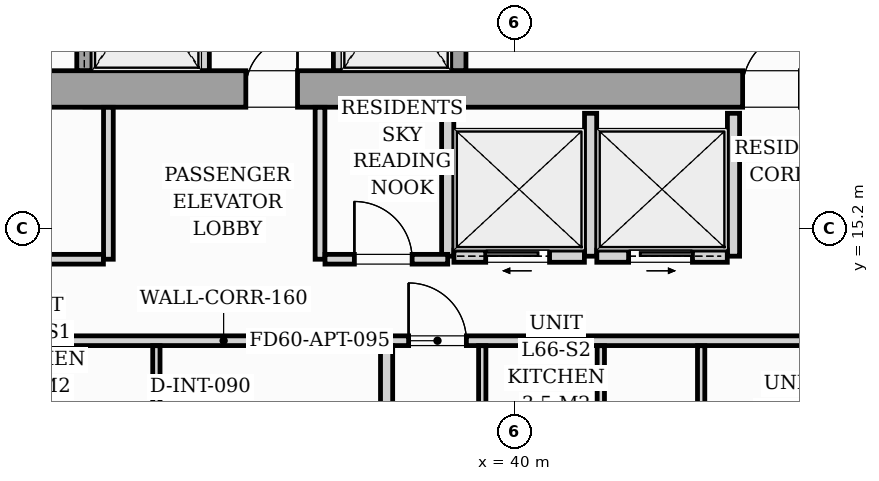
"""IFC4 building model, lengths in metres.
Left out: names, types, materials, properties, quantities, classifications, styles, units other than length and angle.
Written with IfcOpenShell. Run it as: python <this file> out.ifc"""

import sys

from ifc_helpers import new_model, si_unit, direction, frame, frame_2d, origin, origin_2d, place, context, subcontext, project, spatial, rectangle, i_section, extrude, source, transform, mapped, element, fill, save


model = new_model("IFC4")
c1 = context("Model", 3, precision=1e-05, world=origin(), true_north=direction((0.0, 1.0)))
c2 = subcontext(c1, "Body", "Model", "MODEL_VIEW")
j1 = project(units=[si_unit("LENGTHUNIT", "METRE"), si_unit("PLANEANGLEUNIT", "RADIAN")], contexts=[c1])
p1 = place(None, origin())
s1 = spatial("IfcSite", under=j1, at=p1, CompositionType="ELEMENT")
p2 = place(p1, origin())
s2 = spatial("IfcBuilding", under=s1, at=p2, CompositionType="ELEMENT")
p3 = place(p2, frame((0.0, 0.0, 229.8)))
s3 = spatial("IfcBuildingStorey", under=s2, at=p3, CompositionType="ELEMENT", Elevation=229.8)
m1 = source(origin(), c2, "Body", "SweptSolid", [
    extrude(i_section(OverallWidth=0.409, OverallDepth=0.425, WebThickness=0.033, FlangeThickness=0.052, FilletRadius=0.018, at=origin_2d()), origin(), (0.0, 0.0, 1.0), 3.296),
])
for number, where, z_axis, x_axis in (
    (1, (33.12, 17.4, 0.002), (0.0, 0.0, 1.0), (1.0, 0.0, 0.0)),
    (2, (38.88, 17.4, 0.002), (0.0, 0.0, 1.0), (1.0, 0.0, 0.0)),
):
    element("IfcColumn", number, at=place(p3, frame(where, z_axis=z_axis, x_axis=x_axis)), inside=s3, PredefinedType="PILASTER", context=c2, shape_type="MappedRepresentation", body=[
        mapped(m1, transform((0.0, 0.0, 0.0), scale=1.0)),
    ])
p4 = place(p3, frame((26.2, 17.5, 0.0), z_axis=(0.0, 0.0, 1.0), x_axis=(1.0, 0.0, 0.0)))
e3 = element("IfcWall", 3, at=p4, inside=s3, PredefinedType="SHEAR", context=c2, shape_type="SweptSolid", body=[
    extrude(rectangle(XDim=19.6, YDim=0.6, at=frame_2d((9.8, 0.0))), origin(), (0.0, 0.0, 1.0), 3.3),
])
p5 = place(p4, frame((0.95, 0.0, 0.0)))
e4 = element("IfcOpeningElement", 4, at=p5, cuts=e3, PredefinedType="OPENING", context=c2, shape_type="SweptSolid", body=[
    extrude(rectangle(XDim=0.95, YDim=2.06, at=frame_2d((0.475, 1.03))), frame((0.0, 0.31, 0.0), z_axis=(0.0, -1.0, 0.0), x_axis=(1.0, 0.0, 0.0)), (0.0, 0.0, 1.0), 0.62),
])
p6 = place(p4, frame((9.38, 0.0, 0.0)))
e5 = element("IfcOpeningElement", 5, at=p6, cuts=e3, PredefinedType="OPENING", context=c2, shape_type="SweptSolid", body=[
    extrude(rectangle(XDim=0.85, YDim=2.0, at=frame_2d((0.425, 1.0))), frame((0.0, 0.31, 0.0), z_axis=(0.0, -1.0, 0.0), x_axis=(1.0, 0.0, 0.0)), (0.0, 0.0, 1.0), 0.62),
])
p7 = place(p4, frame((17.55, 0.0, 0.0)))
e6 = element("IfcOpeningElement", 6, at=p7, cuts=e3, PredefinedType="OPENING", context=c2, shape_type="SweptSolid", body=[
    extrude(rectangle(XDim=0.95, YDim=2.06, at=frame_2d((0.475, 1.03))), frame((0.0, 0.31, 0.0), z_axis=(0.0, -1.0, 0.0), x_axis=(1.0, 0.0, 0.0)), (0.0, 0.0, 1.0), 0.62),
])
p8 = place(p3, frame((32.925, 17.802, 0.0), z_axis=(0.0, 0.0, 1.0), x_axis=(0.0, 1.0, 0.0)))
e7 = element("IfcWall", 7, at=p8, inside=s3, PredefinedType="SOLIDWALL", context=c2, shape_type="SweptSolid", body=[
    extrude(rectangle(XDim=2.646, YDim=0.25, at=frame_2d((1.323, 0.0))), origin(), (0.0, 0.0, 1.0), 3.3),
])
p9 = place(p8, frame((0.548, 0.0, 0.0)))
e8 = element("IfcOpeningElement", 8, at=p9, cuts=e7, PredefinedType="OPENING", context=c2, shape_type="SweptSolid", body=[
    extrude(rectangle(XDim=1.1, YDim=2.08, at=frame_2d((0.55, 1.04))), frame((0.0, 0.135, 0.0), z_axis=(0.0, -1.0, 0.0), x_axis=(1.0, 0.0, 0.0)), (0.0, 0.0, 1.0), 0.27),
])
for number, where, z_axis, x_axis in (
    (9, (34.9, 17.802, 0.0), (0.0, 0.0, 1.0), (0.0, 1.0, 0.0)),
    (10, (37.1, 17.802, 0.0), (0.0, 0.0, 1.0), (0.0, 1.0, 0.0)),
):
    element("IfcWall", number, at=place(p3, frame(where, z_axis=z_axis, x_axis=x_axis)), inside=s3, PredefinedType="PARTITIONING", context=c2, shape_type="SweptSolid", body=[
        extrude(rectangle(XDim=2.646, YDim=0.16, at=frame_2d((1.323, 0.0))), origin(), (0.0, 0.0, 1.0), 3.04),
    ])
p10 = place(p3, frame((39.075, 17.802, 0.0), z_axis=(0.0, 0.0, 1.0), x_axis=(0.0, 1.0, 0.0)))
e11 = element("IfcWall", 11, at=p10, inside=s3, PredefinedType="SOLIDWALL", context=c2, shape_type="SweptSolid", body=[
    extrude(rectangle(XDim=2.646, YDim=0.25, at=frame_2d((1.323, 0.0))), origin(), (0.0, 0.0, 1.0), 3.3),
])
p11 = place(p10, frame((0.548, 0.0, 0.0)))
e12 = element("IfcOpeningElement", 12, at=p11, cuts=e11, PredefinedType="OPENING", context=c2, shape_type="SweptSolid", body=[
    extrude(rectangle(XDim=1.1, YDim=2.08, at=frame_2d((0.55, 1.04))), frame((0.0, 0.135, 0.0), z_axis=(0.0, -1.0, 0.0), x_axis=(1.0, 0.0, 0.0)), (0.0, 0.0, 1.0), 0.27),
])
for number, where, z_axis, x_axis in (
    (13, (38.9, 14.75, 0.0), (0.0, 0.0, 1.0), (0.0, 1.0, 0.0)),
    (14, (41.25, 14.75, 0.0), (0.0, 0.0, 1.0), (0.0, 1.0, 0.0)),
    (15, (43.6, 14.75, 0.0), (0.0, 0.0, 1.0), (0.0, 1.0, 0.0)),
):
    element("IfcWall", number, at=place(p3, frame(where, z_axis=z_axis, x_axis=x_axis)), inside=s3, PredefinedType="PARTITIONING", context=c2, shape_type="SweptSolid", body=[
        extrude(rectangle(XDim=2.35, YDim=0.2, at=frame_2d((1.175, 0.0))), origin(), (0.0, 0.0, 1.0), 3.04),
    ])
p12 = place(p3, frame((39.002, 14.75, 0.0), z_axis=(0.0, 0.0, 1.0), x_axis=(1.0, 0.0, 0.0)))
e16 = element("IfcWall", 16, at=p12, inside=s3, PredefinedType="PARTITIONING", context=c2, shape_type="SweptSolid", body=[
    extrude(rectangle(XDim=2.146, YDim=0.2, at=frame_2d((1.073, 0.0))), origin(), (0.0, 0.0, 1.0), 3.04),
])
p13 = place(p12, frame((0.523, 0.0, 0.0)))
e17 = element("IfcOpeningElement", 17, at=p13, cuts=e16, PredefinedType="OPENING", context=c2, shape_type="SweptSolid", body=[
    extrude(rectangle(XDim=1.05, YDim=2.08, at=frame_2d((0.525, 1.04))), frame((0.0, 0.11, 0.0), z_axis=(0.0, -1.0, 0.0), x_axis=(1.0, 0.0, 0.0)), (0.0, 0.0, 1.0), 0.22),
])
p14 = place(p3, frame((41.352, 14.75, 0.0), z_axis=(0.0, 0.0, 1.0), x_axis=(1.0, 0.0, 0.0)))
e18 = element("IfcWall", 18, at=p14, inside=s3, PredefinedType="PARTITIONING", context=c2, shape_type="SweptSolid", body=[
    extrude(rectangle(XDim=2.146, YDim=0.2, at=frame_2d((1.073, 0.0))), origin(), (0.0, 0.0, 1.0), 3.04),
])
p15 = place(p14, frame((0.523, 0.0, 0.0)))
e19 = element("IfcOpeningElement", 19, at=p15, cuts=e18, PredefinedType="OPENING", context=c2, shape_type="SweptSolid", body=[
    extrude(rectangle(XDim=1.05, YDim=2.08, at=frame_2d((0.525, 1.04))), frame((0.0, 0.11, 0.0), z_axis=(0.0, -1.0, 0.0), x_axis=(1.0, 0.0, 0.0)), (0.0, 0.0, 1.0), 0.22),
])
p16 = place(p3, frame((24.55, 13.36, 0.0), z_axis=(0.0, 0.0, 1.0), x_axis=(1.0, 0.0, 0.0)))
e20 = element("IfcWall", 20, at=p16, inside=s3, PredefinedType="PARTITIONING", context=c2, shape_type="SweptSolid", body=[
    extrude(rectangle(XDim=21.33, YDim=0.16, at=frame_2d((10.665, 0.0))), origin(), (0.0, 0.0, 1.0), 2.55),
])
p17 = place(p16, frame((2.37, 0.0, 0.0)))
e21 = element("IfcOpeningElement", 21, at=p17, cuts=e20, PredefinedType="OPENING", context=c2, shape_type="SweptSolid", body=[
    extrude(rectangle(XDim=0.95, YDim=2.06, at=frame_2d((0.475, 1.03))), frame((0.0, 0.09, 0.0), z_axis=(0.0, -1.0, 0.0), x_axis=(1.0, 0.0, 0.0)), (0.0, 0.0, 1.0), 0.18),
])
p18 = place(p16, frame((13.707, 0.0, 0.0)))
e22 = element("IfcOpeningElement", 22, at=p18, cuts=e20, PredefinedType="OPENING", context=c2, shape_type="SweptSolid", body=[
    extrude(rectangle(XDim=0.95, YDim=2.06, at=frame_2d((0.475, 1.03))), frame((0.0, 0.09, 0.0), z_axis=(0.0, -1.0, 0.0), x_axis=(1.0, 0.0, 0.0)), (0.0, 0.0, 1.0), 0.18),
])
p19 = place(p3, frame((34.109, 9.024, 0.0), z_axis=(0.0, 0.0, 1.0), x_axis=(0.0, 1.0, 0.0)))
e23 = element("IfcWall", 23, at=p19, inside=s3, PredefinedType="PARTITIONING", context=c2, shape_type="SweptSolid", body=[
    extrude(rectangle(XDim=4.254, YDim=0.12, at=frame_2d((2.127, 0.0))), origin(), (0.0, 0.0, 1.0), 3.04),
])
p20 = place(p19, frame((2.395, 0.0, 0.0)))
e24 = element("IfcOpeningElement", 24, at=p20, cuts=e23, PredefinedType="OPENING", context=c2, shape_type="SweptSolid", body=[
    extrude(rectangle(XDim=0.9, YDim=2.05, at=frame_2d((0.45, 1.025))), frame((0.0, 0.07, 0.0), z_axis=(0.0, -1.0, 0.0), x_axis=(1.0, 0.0, 0.0)), (0.0, 0.0, 1.0), 0.14),
])
p21 = place(p3, frame((37.895, 8.68, 0.0), z_axis=(0.0, 0.0, 1.0), x_axis=(0.0, 1.0, 0.0)))
e25 = element("IfcWall", 25, at=p21, inside=s3, PredefinedType="PARTITIONING", context=c2, shape_type="SweptSolid", body=[
    extrude(rectangle(XDim=4.598, YDim=0.2, at=frame_2d((2.299, 0.0))), origin(), (0.0, 0.0, 1.0), 3.04),
])
p22 = place(p3, frame((43.068, 8.392, 0.0), z_axis=(0.0, 0.0, 1.0), x_axis=(0.0, 1.0, 0.0)))
e26 = element("IfcWall", 26, at=p22, inside=s3, PredefinedType="PARTITIONING", context=c2, shape_type="SweptSolid", body=[
    extrude(rectangle(XDim=4.886, YDim=0.12, at=frame_2d((2.443, 0.0))), origin(), (0.0, 0.0, 1.0), 3.04),
])
p23 = place(p22, frame((1.94, 0.0, 0.0)))
e27 = element("IfcOpeningElement", 27, at=p23, cuts=e26, PredefinedType="OPENING", context=c2, shape_type="SweptSolid", body=[
    extrude(rectangle(XDim=0.85, YDim=2.05, at=frame_2d((0.425, 1.025))), frame((0.0, 0.07, 0.0), z_axis=(0.0, -1.0, 0.0), x_axis=(1.0, 0.0, 0.0)), (0.0, 0.0, 1.0), 0.14),
])
for number, where, z_axis, x_axis in (
    (28, (39.468, 11.372, 0.0), (0.0, 0.0, 1.0), (0.0, 1.0, 0.0)),
    (29, (41.418, 11.372, 0.0), (0.0, 0.0, 1.0), (0.0, 1.0, 0.0)),
):
    element("IfcWall", number, at=place(p3, frame(where, z_axis=z_axis, x_axis=x_axis)), inside=s3, PredefinedType="PARTITIONING", context=c2, shape_type="SweptSolid", body=[
        extrude(rectangle(XDim=1.906, YDim=0.12, at=frame_2d((0.953, 0.0))), origin(), (0.0, 0.0, 1.0), 3.04),
    ])
p24 = place(p3, frame((33.32, 14.7, 0.0), z_axis=(0.0, 0.0, 1.0), x_axis=(0.0, 1.0, 0.0)))
e30 = element("IfcWall", 30, at=p24, inside=s3, PredefinedType="PARTITIONING", context=c2, shape_type="SweptSolid", body=[
    extrude(rectangle(XDim=2.498, YDim=0.16, at=frame_2d((1.249, 0.0))), origin(), (0.0, 0.0, 1.0), 3.04),
])
p25 = place(p3, frame((28.442, 14.7, 0.0), z_axis=(0.0, 0.0, 1.0), x_axis=(1.0, 0.0, 0.0)))
e31 = element("IfcWall", 31, at=p25, inside=s3, PredefinedType="PARTITIONING", context=c2, shape_type="SweptSolid", body=[
    extrude(rectangle(XDim=4.796, YDim=0.16, at=frame_2d((2.398, 0.0))), origin(), (0.0, 0.0, 1.0), 2.55),
])
p26 = place(p25, frame((1.923, 0.0, 0.0)))
e32 = element("IfcOpeningElement", 32, at=p26, cuts=e31, PredefinedType="OPENING", context=c2, shape_type="SweptSolid", body=[
    extrude(rectangle(XDim=0.95, YDim=2.06, at=frame_2d((0.475, 1.03))), frame((0.0, 0.09, 0.0), z_axis=(0.0, -1.0, 0.0), x_axis=(1.0, 0.0, 0.0)), (0.0, 0.0, 1.0), 0.18),
])
p27 = place(p3, frame((36.8, 14.7, 0.0), z_axis=(0.0, 0.0, 1.0), x_axis=(0.0, 1.0, 0.0)))
e33 = element("IfcWall", 33, at=p27, inside=s3, PredefinedType="PARTITIONING", context=c2, shape_type="SweptSolid", body=[
    extrude(rectangle(XDim=2.498, YDim=0.16, at=frame_2d((1.249, 0.0))), origin(), (0.0, 0.0, 1.0), 3.04),
])
p28 = place(p3, frame((36.882, 14.7, 0.0), z_axis=(0.0, 0.0, 1.0), x_axis=(1.0, 0.0, 0.0)))
e34 = element("IfcWall", 34, at=p28, inside=s3, PredefinedType="PARTITIONING", context=c2, shape_type="SweptSolid", body=[
    extrude(rectangle(XDim=2.018, YDim=0.16, at=frame_2d((1.009, 0.0))), origin(), (0.0, 0.0, 1.0), 3.04),
])
p29 = place(p28, frame((0.483, 0.0, 0.0)))
e35 = element("IfcOpeningElement", 35, at=p29, cuts=e34, PredefinedType="OPENING", context=c2, shape_type="SweptSolid", body=[
    extrude(rectangle(XDim=0.95, YDim=2.06, at=frame_2d((0.475, 1.03))), frame((0.0, 0.09, 0.0), z_axis=(0.0, -1.0, 0.0), x_axis=(1.0, 0.0, 0.0)), (0.0, 0.0, 1.0), 0.18),
])
m2 = source(origin(), c2, "Body", "SweptSolid", [
    extrude(rectangle(XDim=0.85, YDim=2.0, at=frame_2d((0.425, 1.0))), frame((0.0, 0.025, 0.0), z_axis=(0.0, -1.0, 0.0), x_axis=(1.0, 0.0, 0.0)), (0.0, 0.0, 1.0), 0.05),
])
p30 = place(p6, origin())
e36 = element("IfcDoor", 36, at=p30, inside=s3, OperationType="SINGLE_SWING_RIGHT", PredefinedType="DOOR", context=c2, shape_type="MappedRepresentation", body=[
    mapped(m2, transform((0.0, 0.0, 0.0), scale=1.0)),
])
fill(e5, e36)
m3 = source(origin(), c2, "Body", "SweptSolid", [
    extrude(rectangle(XDim=0.95, YDim=2.06, at=frame_2d((0.475, 1.03))), frame((0.0, 0.025, 0.0), z_axis=(0.0, -1.0, 0.0), x_axis=(1.0, 0.0, 0.0)), (0.0, 0.0, 1.0), 0.05),
])
p31 = place(p7, origin())
e37 = element("IfcDoor", 37, at=p31, inside=s3, OperationType="SINGLE_SWING_RIGHT", PredefinedType="DOOR", context=c2, shape_type="MappedRepresentation", body=[
    mapped(m3, transform((0.0, 0.0, 0.0), scale=1.0)),
])
fill(e6, e37)
m4 = source(origin(), c2, "Body", "SweptSolid", [
    extrude(rectangle(XDim=1.05, YDim=2.08, at=frame_2d((0.525, 1.04))), frame((0.0, 0.025, 0.0), z_axis=(0.0, -1.0, 0.0), x_axis=(1.0, 0.0, 0.0)), (0.0, 0.0, 1.0), 0.05),
])
p32 = place(p13, origin())
e38 = element("IfcDoor", 38, at=p32, inside=s3, OperationType="SLIDING_TO_LEFT", PredefinedType="DOOR", context=c2, shape_type="MappedRepresentation", body=[
    mapped(m4, transform((0.0, 0.0, 0.0), scale=1.0)),
])
fill(e17, e38)
p33 = place(p15, origin())
e39 = element("IfcDoor", 39, at=p33, inside=s3, OperationType="SLIDING_TO_RIGHT", PredefinedType="DOOR", context=c2, shape_type="MappedRepresentation", body=[
    mapped(m4, transform((0.0, 0.0, 0.0), scale=1.0)),
])
fill(e19, e39)
m5 = source(origin(), c2, "Body", "SweptSolid", [
    extrude(rectangle(XDim=0.95, YDim=2.06, at=frame_2d((0.475, 1.03))), frame((0.0, 0.025, 0.0), z_axis=(0.0, -1.0, 0.0), x_axis=(1.0, 0.0, 0.0)), (0.0, 0.0, 1.0), 0.05),
])
p34 = place(p18, origin())
e40 = element("IfcDoor", 40, at=p34, inside=s3, OperationType="SINGLE_SWING_LEFT", PredefinedType="DOOR", context=c2, shape_type="MappedRepresentation", body=[
    mapped(m5, transform((0.0, 0.0, 0.0), scale=1.0)),
])
fill(e22, e40)
p35 = place(p29, origin())
e41 = element("IfcDoor", 41, at=p35, inside=s3, OperationType="SINGLE_SWING_LEFT", PredefinedType="DOOR", context=c2, shape_type="MappedRepresentation", body=[
    mapped(m5, transform((0.0, 0.0, 0.0), scale=1.0)),
])
fill(e35, e41)
save(model, sys.argv[1])
